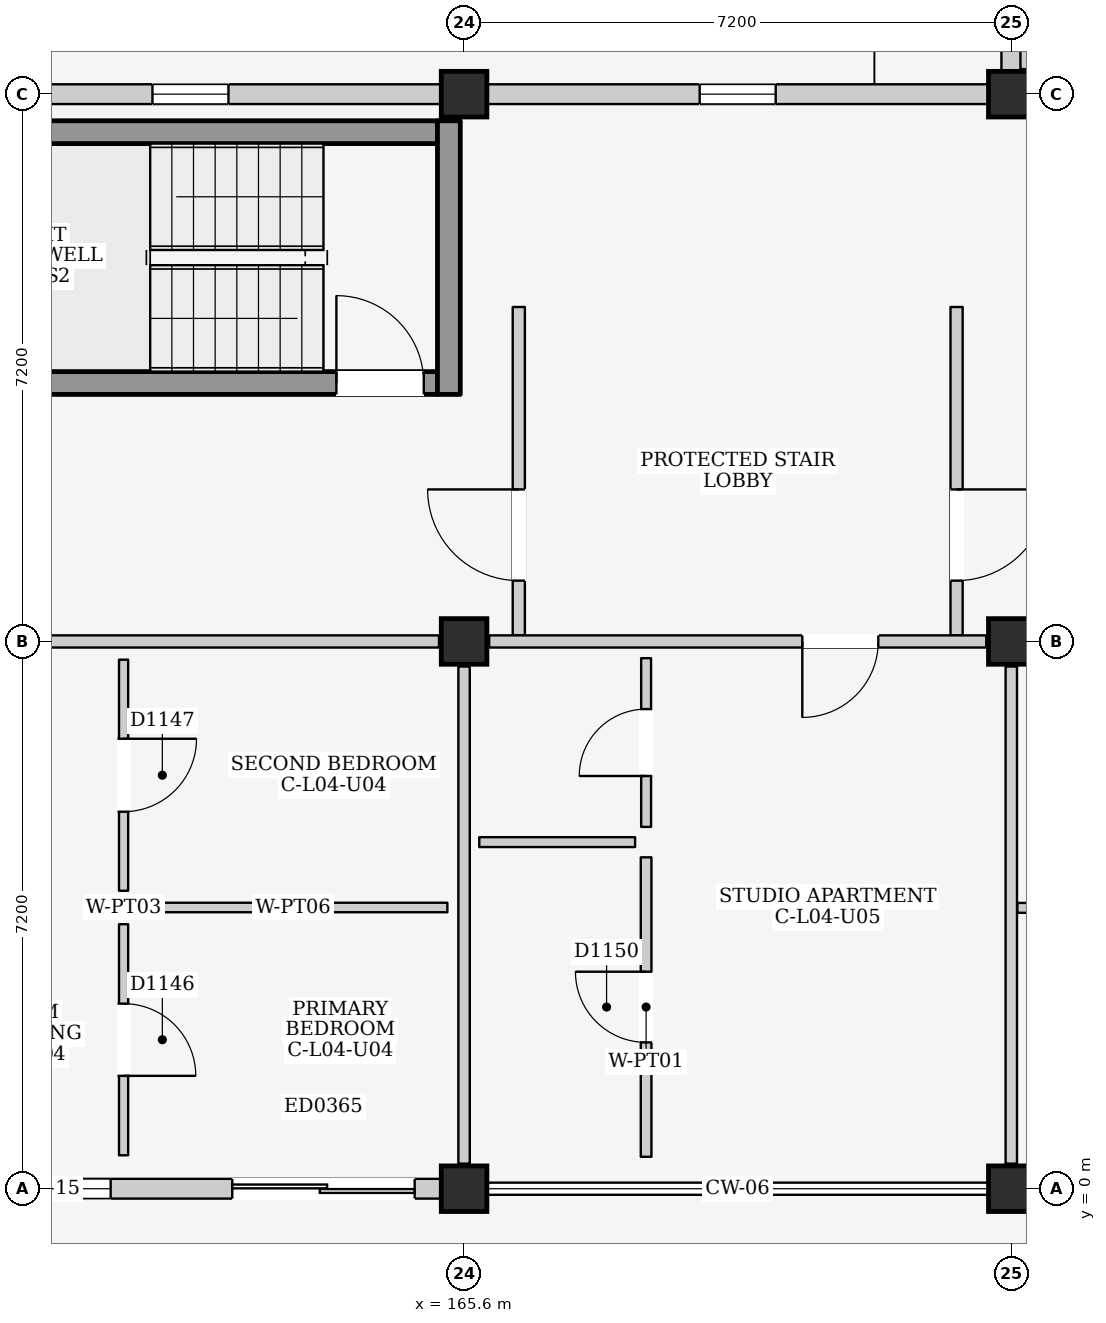
"""IFC4 building model, lengths in metres.
Left out: names, types, materials, properties, quantities, classifications, styles, units other than length and angle.
Written with IfcOpenShell. Run it as: python <this file> out.ifc"""

import sys

from ifc_helpers import new_model, si_unit, direction, frame, frame_2d, origin, origin_2d, place, context, subcontext, project, spatial, rectangle, extrude, element, fill, save


model = new_model("IFC4")
c1 = context("Model", 3, precision=1e-05, world=origin(), true_north=direction((0.0, 1.0)))
c2 = subcontext(c1, "Body", "Model", "MODEL_VIEW")
j1 = project(units=[si_unit("LENGTHUNIT", "METRE"), si_unit("PLANEANGLEUNIT", "RADIAN")], contexts=[c1])
p1 = place(None, origin())
s1 = spatial("IfcSite", under=j1, at=p1, CompositionType="ELEMENT")
p2 = place(p1, origin())
s2 = spatial("IfcBuilding", under=s1, at=p2, CompositionType="ELEMENT")
p3 = place(p2, frame((0.0, 0.0, 15.4)))
s3 = spatial("IfcBuildingStorey", under=s2, at=p3, CompositionType="ELEMENT", Elevation=15.4)
for number, where, z_axis, x_axis in (
    (1, (165.6, 0.0, 0.0), (0.0, 0.0, 1.0), (1.0, 0.0, 0.0)),
    (2, (165.6, 7.2, 0.0), (0.0, 0.0, 1.0), (1.0, 0.0, 0.0)),
    (3, (165.6, 14.4, 0.0), (0.0, 0.0, 1.0), (1.0, 0.0, 0.0)),
    (4, (172.8, 0.0, 0.0), (0.0, 0.0, 1.0), (1.0, 0.0, 0.0)),
    (5, (172.8, 7.2, 0.0), (0.0, 0.0, 1.0), (1.0, 0.0, 0.0)),
    (6, (172.8, 14.4, 0.0), (0.0, 0.0, 1.0), (1.0, 0.0, 0.0)),
):
    element("IfcColumn", number, at=place(p3, frame(where, z_axis=z_axis, x_axis=x_axis)), inside=s3, PredefinedType="COLUMN", context=c2, shape_type="SweptSolid", body=[
        extrude(rectangle(XDim=0.6, YDim=0.6, at=origin_2d()), origin(), (0.0, 0.0, 1.0), 3.2),
    ])
p4 = place(p3, frame((158.7, 0.0, 0.0), z_axis=(0.0, 0.0, 1.0), x_axis=(1.0, 0.0, 0.0)))
e7 = element("IfcWall", 7, at=p4, inside=s3, PredefinedType="ELEMENTEDWALL", context=c2, shape_type="SweptSolid", body=[
    extrude(rectangle(XDim=6.6, YDim=0.26, at=frame_2d((3.3, 0.0))), origin(), (0.0, 0.0, 1.0), 2.43),
])
p5 = place(p4, frame((3.85, 0.0, 0.0)))
e8 = element("IfcOpeningElement", 8, at=p5, cuts=e7, PredefinedType="OPENING", context=c2, shape_type="SweptSolid", body=[
    extrude(rectangle(XDim=2.4, YDim=2.12, at=frame_2d((1.2, 1.06))), frame((0.0, 0.145, 0.0), z_axis=(0.0, -1.0, 0.0), x_axis=(1.0, 0.0, 0.0)), (0.0, 0.0, 1.0), 0.29),
])
p6 = place(p4, frame((0.55, 0.0, 0.86)))
e9 = element("IfcOpeningElement", 9, at=p6, cuts=e7, PredefinedType="OPENING", context=c2, shape_type="SweptSolid", body=[
    extrude(rectangle(XDim=1.7, YDim=1.45, at=frame_2d((0.85, 0.725))), frame((0.0, 0.145, 0.0), z_axis=(0.0, -1.0, 0.0), x_axis=(1.0, 0.0, 0.0)), (0.0, 0.0, 1.0), 0.29),
])
p7 = place(p3, frame((158.7, 14.4, 0.0), z_axis=(0.0, 0.0, 1.0), x_axis=(1.0, 0.0, 0.0)))
e10 = element("IfcWall", 10, at=p7, inside=s3, PredefinedType="ELEMENTEDWALL", context=c2, shape_type="SweptSolid", body=[
    extrude(rectangle(XDim=6.6, YDim=0.26, at=frame_2d((3.3, 0.0))), origin(), (0.0, 0.0, 1.0), 2.335),
])
p8 = place(p7, frame((2.8, 0.0, 1.2)))
e11 = element("IfcOpeningElement", 11, at=p8, cuts=e10, PredefinedType="OPENING", context=c2, shape_type="SweptSolid", body=[
    extrude(rectangle(XDim=1.0, YDim=0.9, at=frame_2d((0.5, 0.45))), frame((0.0, 0.145, 0.0), z_axis=(0.0, -1.0, 0.0), x_axis=(1.0, 0.0, 0.0)), (0.0, 0.0, 1.0), 0.29),
])
p9 = place(p3, frame((165.9, 14.4, 0.0), z_axis=(0.0, 0.0, 1.0), x_axis=(1.0, 0.0, 0.0)))
e12 = element("IfcWall", 12, at=p9, inside=s3, PredefinedType="ELEMENTEDWALL", context=c2, shape_type="SweptSolid", body=[
    extrude(rectangle(XDim=6.6, YDim=0.26, at=frame_2d((3.3, 0.0))), origin(), (0.0, 0.0, 1.0), 2.335),
])
p10 = place(p9, frame((2.8, 0.0, 1.2)))
e13 = element("IfcOpeningElement", 13, at=p10, cuts=e12, PredefinedType="OPENING", context=c2, shape_type="SweptSolid", body=[
    extrude(rectangle(XDim=1.0, YDim=0.9, at=frame_2d((0.5, 0.45))), frame((0.0, 0.145, 0.0), z_axis=(0.0, -1.0, 0.0), x_axis=(1.0, 0.0, 0.0)), (0.0, 0.0, 1.0), 0.29),
])
p11 = place(p3, frame((172.8, 14.7, 0.0), z_axis=(0.0, 0.0, 1.0), x_axis=(0.0, 1.0, 0.0)))
e14 = element("IfcWall", 14, at=p11, inside=s3, PredefinedType="ELEMENTEDWALL", context=c2, shape_type="SweptSolid", body=[
    extrude(rectangle(XDim=6.6, YDim=0.26, at=frame_2d((3.3, 0.0))), origin(), (0.0, 0.0, 1.0), 2.385),
])
p12 = place(p11, frame((2.5, 0.0, 0.0)))
e15 = element("IfcOpeningElement", 15, at=p12, cuts=e14, PredefinedType="OPENING", context=c2, shape_type="SweptSolid", body=[
    extrude(rectangle(XDim=1.4, YDim=2.1, at=frame_2d((0.7, 1.05))), frame((0.0, 0.145, 0.0), z_axis=(0.0, -1.0, 0.0), x_axis=(1.0, 0.0, 0.0)), (0.0, 0.0, 1.0), 0.29),
])
p13 = place(p3, frame((158.75, 10.6, 0.0), z_axis=(0.0, 0.0, 1.0), x_axis=(1.0, 0.0, 0.0)))
e16 = element("IfcWall", 16, at=p13, inside=s3, PredefinedType="SHEAR", context=c2, shape_type="SweptSolid", body=[
    extrude(rectangle(XDim=6.5, YDim=0.3, at=frame_2d((3.25, 0.0))), origin(), (0.0, 0.0, 1.0), 2.95),
])
p14 = place(p13, frame((5.17, 0.0, 0.0)))
e17 = element("IfcOpeningElement", 17, at=p14, cuts=e16, PredefinedType="OPENING", context=c2, shape_type="SweptSolid", body=[
    extrude(rectangle(XDim=1.15, YDim=2.2, at=frame_2d((0.575, 1.1))), frame((0.0, 0.165, 0.0), z_axis=(0.0, -1.0, 0.0), x_axis=(1.0, 0.0, 0.0)), (0.0, 0.0, 1.0), 0.33),
])
p15 = place(p3, frame((158.75, 13.9, 0.0), z_axis=(0.0, 0.0, 1.0), x_axis=(1.0, 0.0, 0.0)))
e18 = element("IfcWall", 18, at=p15, inside=s3, PredefinedType="SHEAR", context=c2, shape_type="SweptSolid", body=[
    extrude(rectangle(XDim=6.5, YDim=0.3, at=frame_2d((3.25, 0.0))), origin(), (0.0, 0.0, 1.0), 2.95),
])
p16 = place(p3, frame((165.4, 10.45, 0.0), z_axis=(0.0, 0.0, 1.0), x_axis=(0.0, 1.0, 0.0)))
e19 = element("IfcWall", 19, at=p16, inside=s3, PredefinedType="SHEAR", context=c2, shape_type="SweptSolid", body=[
    extrude(rectangle(XDim=3.6, YDim=0.3, at=frame_2d((1.8, 0.0))), origin(), (0.0, 0.0, 1.0), 2.95),
])
p17 = place(p3, frame((166.32, 7.28, 0.0), z_axis=(0.0, 0.0, 1.0), x_axis=(0.0, 1.0, 0.0)))
e20 = element("IfcWall", 20, at=p17, inside=s3, PredefinedType="PARTITIONING", context=c2, shape_type="SweptSolid", body=[
    extrude(rectangle(XDim=4.32, YDim=0.16, at=frame_2d((2.16, 0.0))), origin(), (0.0, 0.0, 1.0), 2.95),
])
p18 = place(p17, frame((0.72, 0.0, 0.0)))
e21 = element("IfcOpeningElement", 21, at=p18, cuts=e20, PredefinedType="OPENING", context=c2, shape_type="SweptSolid", body=[
    extrude(rectangle(XDim=1.2, YDim=2.2, at=frame_2d((0.6, 1.1))), frame((0.0, 0.095, 0.0), z_axis=(0.0, -1.0, 0.0), x_axis=(1.0, 0.0, 0.0)), (0.0, 0.0, 1.0), 0.19),
])
p19 = place(p3, frame((172.08, 7.28, 0.0), z_axis=(0.0, 0.0, 1.0), x_axis=(0.0, 1.0, 0.0)))
e22 = element("IfcWall", 22, at=p19, inside=s3, PredefinedType="PARTITIONING", context=c2, shape_type="SweptSolid", body=[
    extrude(rectangle(XDim=4.32, YDim=0.16, at=frame_2d((2.16, 0.0))), origin(), (0.0, 0.0, 1.0), 2.95),
])
p20 = place(p19, frame((0.72, 0.0, 0.0)))
e23 = element("IfcOpeningElement", 23, at=p20, cuts=e22, PredefinedType="OPENING", context=c2, shape_type="SweptSolid", body=[
    extrude(rectangle(XDim=1.2, YDim=2.2, at=frame_2d((0.6, 1.1))), frame((0.0, 0.095, 0.0), z_axis=(0.0, -1.0, 0.0), x_axis=(1.0, 0.0, 0.0)), (0.0, 0.0, 1.0), 0.19),
])
p21 = place(p3, frame((158.73, 7.2, 0.0), z_axis=(0.0, 0.0, 1.0), x_axis=(1.0, 0.0, 0.0)))
e24 = element("IfcWall", 24, at=p21, inside=s3, PredefinedType="PARTITIONING", context=c2, shape_type="SweptSolid", body=[
    extrude(rectangle(XDim=6.54, YDim=0.16, at=frame_2d((3.27, 0.0))), origin(), (0.0, 0.0, 1.0), 2.335),
])
p22 = place(p3, frame((165.6, 0.33, 0.0), z_axis=(0.0, 0.0, 1.0), x_axis=(0.0, 1.0, 0.0)))
e25 = element("IfcWall", 25, at=p22, inside=s3, PredefinedType="PARTITIONING", context=c2, shape_type="SweptSolid", body=[
    extrude(rectangle(XDim=6.54, YDim=0.15, at=frame_2d((3.27, 0.0))), origin(), (0.0, 0.0, 1.0), 2.385),
])
p23 = place(p3, frame((161.12, 0.44, 0.0), z_axis=(0.0, 0.0, 1.0), x_axis=(0.0, 1.0, 0.0)))
e26 = element("IfcWall", 26, at=p23, inside=s3, PredefinedType="PARTITIONING", context=c2, shape_type="SweptSolid", body=[
    extrude(rectangle(XDim=3.04, YDim=0.12, at=frame_2d((1.52, 0.0))), origin(), (0.0, 0.0, 1.0), 2.95),
])
p24 = place(p23, frame((1.045, 0.0, 0.0)))
e27 = element("IfcOpeningElement", 27, at=p24, cuts=e26, PredefinedType="OPENING", context=c2, shape_type="SweptSolid", body=[
    extrude(rectangle(XDim=0.95, YDim=2.15, at=frame_2d((0.475, 1.075))), frame((0.0, 0.075, 0.0), z_axis=(0.0, -1.0, 0.0), x_axis=(1.0, 0.0, 0.0)), (0.0, 0.0, 1.0), 0.15),
])
p25 = place(p3, frame((161.32, 3.7, 0.0), z_axis=(0.0, 0.0, 1.0), x_axis=(1.0, 0.0, 0.0)))
e28 = element("IfcWall", 28, at=p25, inside=s3, PredefinedType="PARTITIONING", context=c2, shape_type="SweptSolid", body=[
    extrude(rectangle(XDim=4.06, YDim=0.125, at=frame_2d((2.03, 0.0))), origin(), (0.0, 0.0, 1.0), 2.95),
])
p26 = place(p3, frame((161.12, 3.92, 0.0), z_axis=(0.0, 0.0, 1.0), x_axis=(0.0, 1.0, 0.0)))
e29 = element("IfcWall", 29, at=p26, inside=s3, PredefinedType="PARTITIONING", context=c2, shape_type="SweptSolid", body=[
    extrude(rectangle(XDim=3.04, YDim=0.12, at=frame_2d((1.52, 0.0))), origin(), (0.0, 0.0, 1.0), 2.95),
])
p27 = place(p26, frame((1.04, 0.0, 0.0)))
e30 = element("IfcOpeningElement", 30, at=p27, cuts=e29, PredefinedType="OPENING", context=c2, shape_type="SweptSolid", body=[
    extrude(rectangle(XDim=0.96, YDim=2.15, at=frame_2d((0.48, 1.075))), frame((0.0, 0.075, 0.0), z_axis=(0.0, -1.0, 0.0), x_axis=(1.0, 0.0, 0.0)), (0.0, 0.0, 1.0), 0.15),
])
p28 = place(p3, frame((165.93, 7.2, 0.0), z_axis=(0.0, 0.0, 1.0), x_axis=(1.0, 0.0, 0.0)))
e31 = element("IfcWall", 31, at=p28, inside=s3, PredefinedType="PARTITIONING", context=c2, shape_type="SweptSolid", body=[
    extrude(rectangle(XDim=6.54, YDim=0.16, at=frame_2d((3.27, 0.0))), origin(), (0.0, 0.0, 1.0), 2.335),
])
p29 = place(p28, frame((4.12, 0.0, 0.0)))
e32 = element("IfcOpeningElement", 32, at=p29, cuts=e31, PredefinedType="OPENING", context=c2, shape_type="SweptSolid", body=[
    extrude(rectangle(XDim=1.0, YDim=2.15, at=frame_2d((0.5, 1.075))), frame((0.0, 0.095, 0.0), z_axis=(0.0, -1.0, 0.0), x_axis=(1.0, 0.0, 0.0)), (0.0, 0.0, 1.0), 0.19),
])
p30 = place(p3, frame((172.8, 0.33, 0.0), z_axis=(0.0, 0.0, 1.0), x_axis=(0.0, 1.0, 0.0)))
e33 = element("IfcWall", 33, at=p30, inside=s3, PredefinedType="PARTITIONING", context=c2, shape_type="SweptSolid", body=[
    extrude(rectangle(XDim=6.54, YDim=0.15, at=frame_2d((3.27, 0.0))), origin(), (0.0, 0.0, 1.0), 2.385),
])
p31 = place(p3, frame((165.8, 4.56, 0.0), z_axis=(0.0, 0.0, 1.0), x_axis=(1.0, 0.0, 0.0)))
e34 = element("IfcWall", 34, at=p31, inside=s3, PredefinedType="PARTITIONING", context=c2, shape_type="SweptSolid", body=[
    extrude(rectangle(XDim=2.05, YDim=0.13, at=frame_2d((1.025, 0.0))), origin(), (0.0, 0.0, 1.0), 2.95),
])
p32 = place(p3, frame((167.995, 4.76, 0.0), z_axis=(0.0, 0.0, 1.0), x_axis=(0.0, 1.0, 0.0)))
e35 = element("IfcWall", 35, at=p32, inside=s3, PredefinedType="PARTITIONING", context=c2, shape_type="SweptSolid", body=[
    extrude(rectangle(XDim=2.22, YDim=0.13, at=frame_2d((1.11, 0.0))), origin(), (0.0, 0.0, 1.0), 2.95),
])
p33 = place(p32, frame((0.67, 0.0, 0.0)))
e36 = element("IfcOpeningElement", 36, at=p33, cuts=e35, PredefinedType="OPENING", context=c2, shape_type="SweptSolid", body=[
    extrude(rectangle(XDim=0.88, YDim=2.1, at=frame_2d((0.44, 1.05))), frame((0.0, 0.08, 0.0), z_axis=(0.0, -1.0, 0.0), x_axis=(1.0, 0.0, 0.0)), (0.0, 0.0, 1.0), 0.16),
])
p34 = place(p3, frame((167.995, 0.42, 0.0), z_axis=(0.0, 0.0, 1.0), x_axis=(0.0, 1.0, 0.0)))
e37 = element("IfcWall", 37, at=p34, inside=s3, PredefinedType="PARTITIONING", context=c2, shape_type="SweptSolid", body=[
    extrude(rectangle(XDim=3.94, YDim=0.14, at=frame_2d((1.97, 0.0))), origin(), (0.0, 0.0, 1.0), 2.95),
])
p35 = place(p34, frame((1.505, 0.0, 0.0)))
e38 = element("IfcOpeningElement", 38, at=p35, cuts=e37, PredefinedType="OPENING", context=c2, shape_type="SweptSolid", body=[
    extrude(rectangle(XDim=0.93, YDim=2.14, at=frame_2d((0.465, 1.07))), frame((0.0, 0.085, 0.0), z_axis=(0.0, -1.0, 0.0), x_axis=(1.0, 0.0, 0.0)), (0.0, 0.0, 1.0), 0.17),
])
p36 = place(p3, frame((172.88, 3.695, 0.0), z_axis=(0.0, 0.0, 1.0), x_axis=(1.0, 0.0, 0.0)))
e39 = element("IfcWall", 39, at=p36, inside=s3, PredefinedType="PARTITIONING", context=c2, shape_type="SweptSolid", body=[
    extrude(rectangle(XDim=2.4, YDim=0.13, at=frame_2d((1.2, 0.0))), origin(), (0.0, 0.0, 1.0), 2.95),
])
p37 = place(p36, frame((0.75, 0.0, 0.0)))
e40 = element("IfcOpeningElement", 40, at=p37, cuts=e39, PredefinedType="OPENING", context=c2, shape_type="SweptSolid", body=[
    extrude(rectangle(XDim=0.9, YDim=2.1, at=frame_2d((0.45, 1.05))), frame((0.0, 0.08, 0.0), z_axis=(0.0, -1.0, 0.0), x_axis=(1.0, 0.0, 0.0)), (0.0, 0.0, 1.0), 0.16),
])
p38 = place(p3, frame((173.0, 14.73, 0.0), z_axis=(0.0, 0.0, 1.0), x_axis=(0.0, 1.0, 0.0)))
e41 = element("IfcWall", 41, at=p38, inside=s3, PredefinedType="PARTITIONING", context=c2, shape_type="SweptSolid", body=[
    extrude(rectangle(XDim=6.54, YDim=0.16, at=frame_2d((3.27, 0.0))), origin(), (0.0, 0.0, 1.0), 2.385),
])
p39 = place(p38, frame((2.76, 0.0, 0.0)))
e42 = element("IfcOpeningElement", 42, at=p39, cuts=e41, PredefinedType="OPENING", context=c2, shape_type="SweptSolid", body=[
    extrude(rectangle(XDim=1.02, YDim=2.18, at=frame_2d((0.51, 1.09))), frame((0.0, 0.095, 0.0), z_axis=(0.0, -1.0, 0.0), x_axis=(1.0, 0.0, 0.0)), (0.0, 0.0, 1.0), 0.19),
])
p40 = place(p5, frame((2.4, 0.0, 0.0), z_axis=(0.0, 0.0, 1.0), x_axis=(-1.0, 0.0, 0.0)))
e43 = element("IfcDoor", 43, at=p40, inside=s3, OperationType="DOUBLE_DOOR_SLIDING", PredefinedType="DOOR", context=c2, shape_type="SweptSolid", body=[
    extrude(rectangle(XDim=2.4, YDim=2.12, at=frame_2d((1.2, 1.06))), frame((0.0, 0.025, 0.0), z_axis=(0.0, -1.0, 0.0), x_axis=(1.0, 0.0, 0.0)), (0.0, 0.0, 1.0), 0.05),
])
fill(e8, e43)
p41 = place(p6, origin())
e44 = element("IfcWindow", 44, at=p41, inside=s3, PartitioningType="DOUBLE_PANEL_VERTICAL", PredefinedType="WINDOW", context=c2, shape_type="SweptSolid", body=[
    extrude(rectangle(XDim=1.7, YDim=1.45, at=frame_2d((0.85, 0.725))), frame((0.0, 0.03, 0.0), z_axis=(0.0, -1.0, 0.0), x_axis=(1.0, 0.0, 0.0)), (0.0, 0.0, 1.0), 0.06),
])
fill(e9, e44)
p42 = place(p8, origin())
e45 = element("IfcWindow", 45, at=p42, inside=s3, PartitioningType="SINGLE_PANEL", PredefinedType="WINDOW", context=c2, shape_type="SweptSolid", body=[
    extrude(rectangle(XDim=1.0, YDim=0.9, at=frame_2d((0.5, 0.45))), frame((0.0, 0.03, 0.0), z_axis=(0.0, -1.0, 0.0), x_axis=(1.0, 0.0, 0.0)), (0.0, 0.0, 1.0), 0.06),
])
fill(e11, e45)
p43 = place(p10, origin())
e46 = element("IfcWindow", 46, at=p43, inside=s3, PartitioningType="SINGLE_PANEL", PredefinedType="WINDOW", context=c2, shape_type="SweptSolid", body=[
    extrude(rectangle(XDim=1.0, YDim=0.9, at=frame_2d((0.5, 0.45))), frame((0.0, 0.03, 0.0), z_axis=(0.0, -1.0, 0.0), x_axis=(1.0, 0.0, 0.0)), (0.0, 0.0, 1.0), 0.06),
])
fill(e13, e46)
p44 = place(p14, origin())
e47 = element("IfcDoor", 47, at=p44, inside=s3, OperationType="SINGLE_SWING_LEFT", PredefinedType="DOOR", context=c2, shape_type="SweptSolid", body=[
    extrude(rectangle(XDim=1.15, YDim=2.2, at=frame_2d((0.575, 1.1))), frame((0.0, 0.025, 0.0), z_axis=(0.0, -1.0, 0.0), x_axis=(1.0, 0.0, 0.0)), (0.0, 0.0, 1.0), 0.05),
])
fill(e17, e47)
p45 = place(p18, origin())
e48 = element("IfcDoor", 48, at=p45, inside=s3, OperationType="SINGLE_SWING_RIGHT", PredefinedType="DOOR", context=c2, shape_type="SweptSolid", body=[
    extrude(rectangle(XDim=1.2, YDim=2.2, at=frame_2d((0.6, 1.1))), frame((0.0, 0.025, 0.0), z_axis=(0.0, -1.0, 0.0), x_axis=(1.0, 0.0, 0.0)), (0.0, 0.0, 1.0), 0.05),
])
fill(e21, e48)
p46 = place(p20, frame((1.2, 0.0, 0.0), z_axis=(0.0, 0.0, 1.0), x_axis=(-1.0, 0.0, 0.0)))
e49 = element("IfcDoor", 49, at=p46, inside=s3, OperationType="SINGLE_SWING_LEFT", PredefinedType="DOOR", context=c2, shape_type="SweptSolid", body=[
    extrude(rectangle(XDim=1.2, YDim=2.2, at=frame_2d((0.6, 1.1))), frame((0.0, 0.025, 0.0), z_axis=(0.0, -1.0, 0.0), x_axis=(1.0, 0.0, 0.0)), (0.0, 0.0, 1.0), 0.05),
])
fill(e23, e49)
p47 = place(p24, frame((0.95, 0.0, 0.0), z_axis=(0.0, 0.0, 1.0), x_axis=(-1.0, 0.0, 0.0)))
e50 = element("IfcDoor", 50, at=p47, inside=s3, OperationType="SINGLE_SWING_RIGHT", PredefinedType="DOOR", context=c2, shape_type="SweptSolid", body=[
    extrude(rectangle(XDim=0.95, YDim=2.15, at=frame_2d((0.475, 1.075))), frame((0.0, 0.025, 0.0), z_axis=(0.0, -1.0, 0.0), x_axis=(1.0, 0.0, 0.0)), (0.0, 0.0, 1.0), 0.05),
])
fill(e27, e50)
p48 = place(p27, frame((0.96, 0.0, 0.0), z_axis=(0.0, 0.0, 1.0), x_axis=(-1.0, 0.0, 0.0)))
e51 = element("IfcDoor", 51, at=p48, inside=s3, OperationType="SINGLE_SWING_LEFT", PredefinedType="DOOR", context=c2, shape_type="SweptSolid", body=[
    extrude(rectangle(XDim=0.96, YDim=2.15, at=frame_2d((0.48, 1.075))), frame((0.0, 0.025, 0.0), z_axis=(0.0, -1.0, 0.0), x_axis=(1.0, 0.0, 0.0)), (0.0, 0.0, 1.0), 0.05),
])
fill(e30, e51)
p49 = place(p29, frame((1.0, 0.0, 0.0), z_axis=(0.0, 0.0, 1.0), x_axis=(-1.0, 0.0, 0.0)))
e52 = element("IfcDoor", 52, at=p49, inside=s3, OperationType="SINGLE_SWING_RIGHT", PredefinedType="DOOR", context=c2, shape_type="SweptSolid", body=[
    extrude(rectangle(XDim=1.0, YDim=2.15, at=frame_2d((0.5, 1.075))), frame((0.0, 0.025, 0.0), z_axis=(0.0, -1.0, 0.0), x_axis=(1.0, 0.0, 0.0)), (0.0, 0.0, 1.0), 0.05),
])
fill(e32, e52)
p50 = place(p33, origin())
e53 = element("IfcDoor", 53, at=p50, inside=s3, OperationType="SINGLE_SWING_LEFT", PredefinedType="DOOR", context=c2, shape_type="SweptSolid", body=[
    extrude(rectangle(XDim=0.88, YDim=2.1, at=frame_2d((0.44, 1.05))), frame((0.0, 0.025, 0.0), z_axis=(0.0, -1.0, 0.0), x_axis=(1.0, 0.0, 0.0)), (0.0, 0.0, 1.0), 0.05),
])
fill(e36, e53)
p51 = place(p35, origin())
e54 = element("IfcDoor", 54, at=p51, inside=s3, OperationType="SINGLE_SWING_RIGHT", PredefinedType="DOOR", context=c2, shape_type="SweptSolid", body=[
    extrude(rectangle(XDim=0.93, YDim=2.14, at=frame_2d((0.465, 1.07))), frame((0.0, 0.025, 0.0), z_axis=(0.0, -1.0, 0.0), x_axis=(1.0, 0.0, 0.0)), (0.0, 0.0, 1.0), 0.05),
])
fill(e38, e54)
save(model, sys.argv[1])
